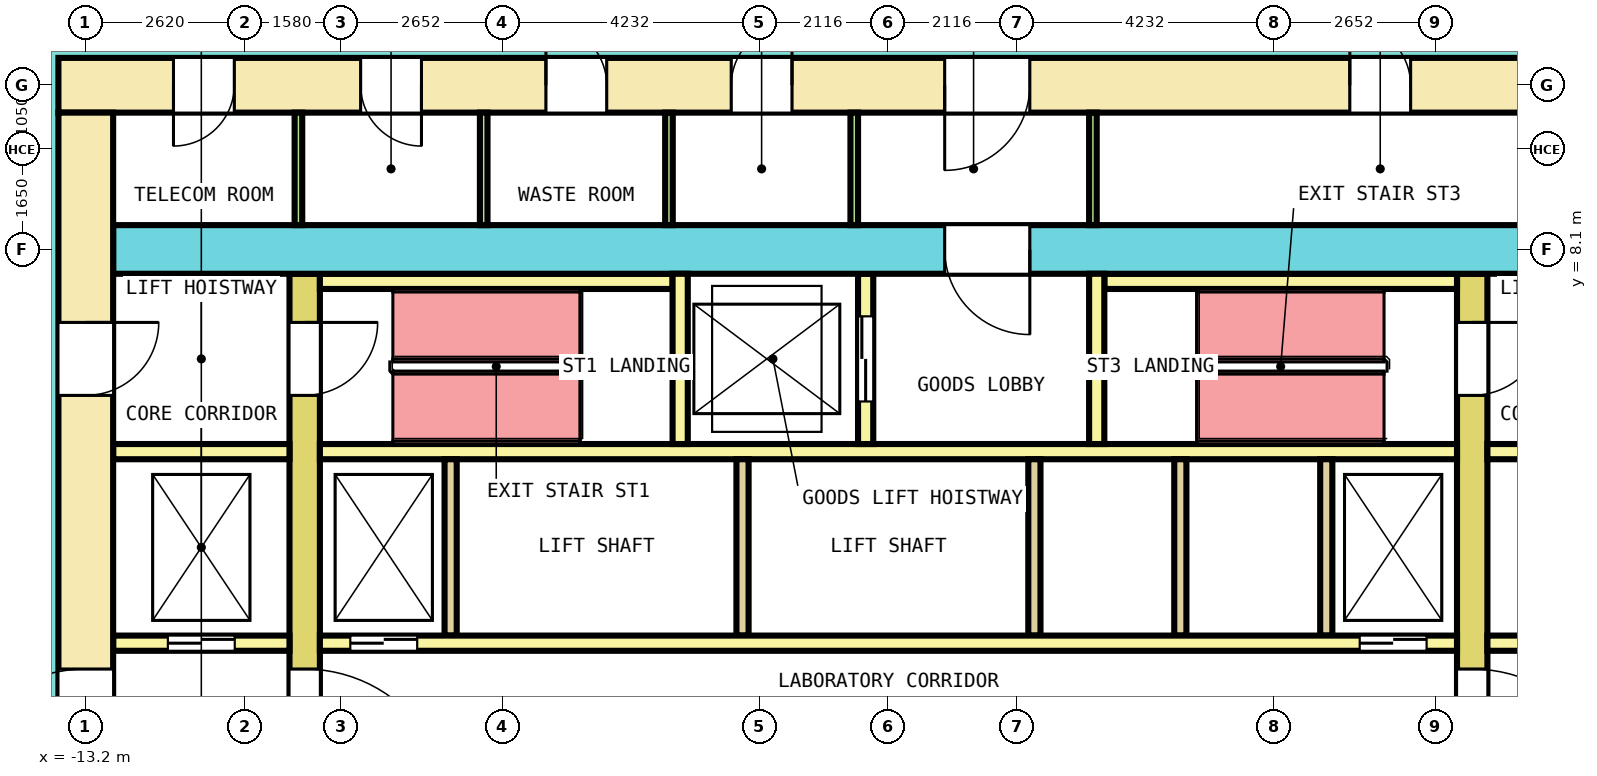
"""IFC4 building model, lengths in metres.
Left out: names, types, materials, properties, quantities, classifications, styles, units other than length and angle.
Written with IfcOpenShell. Run it as: python <this file> out.ifc"""

import sys

from ifc_helpers import new_model, si_unit, direction, frame, frame_2d, origin, place, context, subcontext, project, spatial, rectangle, extrude, element, fill, save


model = new_model("IFC4")
c1 = context("Model", 3, precision=1e-05, world=origin(), true_north=direction((0.0, 1.0)))
c2 = subcontext(c1, "Body", "Model", "MODEL_VIEW")
j1 = project(units=[si_unit("LENGTHUNIT", "METRE"), si_unit("PLANEANGLEUNIT", "RADIAN")], contexts=[c1])
p1 = place(None, origin())
s1 = spatial("IfcSite", under=j1, at=p1, CompositionType="ELEMENT")
p2 = place(p1, origin())
s2 = spatial("IfcBuilding", under=s1, at=p2, CompositionType="ELEMENT")
p3 = place(p2, frame((0.0, 0.0, 10.2)))
s3 = spatial("IfcBuildingStorey", under=s2, at=p3, CompositionType="ELEMENT", Elevation=10.2)
p4 = place(p3, frame((-13.65, 10.8, 0.0), z_axis=(0.0, 0.0, 1.0), x_axis=(1.0, 0.0, 0.0)))
e1 = element("IfcWall", 1, at=p4, inside=s3, PredefinedType="SHEAR", context=c2, shape_type="SweptSolid", body=[
    extrude(rectangle(XDim=27.3, YDim=0.9, at=frame_2d((13.65, 0.0))), origin(), (0.0, 0.0, 1.0), 4.1),
])
p5 = place(p4, frame((1.892, 0.0, 0.0)))
e2 = element("IfcOpeningElement", 2, at=p5, cuts=e1, PredefinedType="OPENING", context=c2, shape_type="SweptSolid", body=[
    extrude(rectangle(XDim=1.0, YDim=2.1, at=frame_2d((0.5, 1.05))), frame((0.0, 0.46, 0.0), z_axis=(0.0, -1.0, 0.0), x_axis=(1.0, 0.0, 0.0)), (0.0, 0.0, 1.0), 0.92),
])
p6 = place(p4, frame((4.97, 0.0, 0.0)))
e3 = element("IfcOpeningElement", 3, at=p6, cuts=e1, PredefinedType="OPENING", context=c2, shape_type="SweptSolid", body=[
    extrude(rectangle(XDim=1.0, YDim=2.1, at=frame_2d((0.5, 1.05))), frame((0.0, 0.46, 0.0), z_axis=(0.0, -1.0, 0.0), x_axis=(1.0, 0.0, 0.0)), (0.0, 0.0, 1.0), 0.92),
])
p7 = place(p4, frame((8.017, 0.0, 0.0)))
e4 = element("IfcOpeningElement", 4, at=p7, cuts=e1, PredefinedType="OPENING", context=c2, shape_type="SweptSolid", body=[
    extrude(rectangle(XDim=1.0, YDim=2.1, at=frame_2d((0.5, 1.05))), frame((0.0, 0.46, 0.0), z_axis=(0.0, -1.0, 0.0), x_axis=(1.0, 0.0, 0.0)), (0.0, 0.0, 1.0), 0.92),
])
p8 = place(p4, frame((11.064, 0.0, 0.0)))
e5 = element("IfcOpeningElement", 5, at=p8, cuts=e1, PredefinedType="OPENING", context=c2, shape_type="SweptSolid", body=[
    extrude(rectangle(XDim=1.0, YDim=2.1, at=frame_2d((0.5, 1.05))), frame((0.0, 0.46, 0.0), z_axis=(0.0, -1.0, 0.0), x_axis=(1.0, 0.0, 0.0)), (0.0, 0.0, 1.0), 0.92),
])
p9 = place(p4, frame((21.238, 0.0, 0.0)))
e6 = element("IfcOpeningElement", 6, at=p9, cuts=e1, PredefinedType="OPENING", context=c2, shape_type="SweptSolid", body=[
    extrude(rectangle(XDim=1.0, YDim=2.1, at=frame_2d((0.5, 1.05))), frame((0.0, 0.46, 0.0), z_axis=(0.0, -1.0, 0.0), x_axis=(1.0, 0.0, 0.0)), (0.0, 0.0, 1.0), 0.92),
])
p10 = place(p4, frame((14.575, 0.0, 0.0)))
e7 = element("IfcOpeningElement", 7, at=p10, cuts=e1, PredefinedType="OPENING", context=c2, shape_type="SweptSolid", body=[
    extrude(rectangle(XDim=1.4, YDim=2.1, at=frame_2d((0.7, 1.05))), frame((0.0, 0.46, 0.0), z_axis=(0.0, -1.0, 0.0), x_axis=(1.0, 0.0, 0.0)), (0.0, 0.0, 1.0), 0.92),
])
p11 = place(p3, frame((-13.2, -10.35, 0.0), z_axis=(0.0, 0.0, 1.0), x_axis=(0.0, 1.0, 0.0)))
e8 = element("IfcWall", 8, at=p11, inside=s3, PredefinedType="SHEAR", context=c2, shape_type="SweptSolid", body=[
    extrude(rectangle(XDim=20.7, YDim=0.9, at=frame_2d((10.35, 0.0))), origin(), (0.0, 0.0, 1.0), 4.1),
])
p12 = place(p11, frame((9.15, 0.0, 0.0)))
e9 = element("IfcOpeningElement", 9, at=p12, cuts=e8, PredefinedType="OPENING", context=c2, shape_type="SweptSolid", body=[
    extrude(rectangle(XDim=2.4, YDim=2.1, at=frame_2d((1.2, 1.05))), frame((0.0, 0.46, 0.0), z_axis=(0.0, -1.0, 0.0), x_axis=(1.0, 0.0, 0.0)), (0.0, 0.0, 1.0), 0.92),
])
p13 = place(p11, frame((16.05, 0.0, 0.0)))
e10 = element("IfcOpeningElement", 10, at=p13, cuts=e8, PredefinedType="OPENING", context=c2, shape_type="SweptSolid", body=[
    extrude(rectangle(XDim=1.2, YDim=2.1, at=frame_2d((0.6, 1.05))), frame((0.0, 0.46, 0.0), z_axis=(0.0, -1.0, 0.0), x_axis=(1.0, 0.0, 0.0)), (0.0, 0.0, 1.0), 0.92),
])
p14 = place(p11, frame((3.45, 0.0, 0.0)))
e11 = element("IfcOpeningElement", 11, at=p14, cuts=e8, PredefinedType="OPENING", context=c2, shape_type="SweptSolid", body=[
    extrude(rectangle(XDim=1.2, YDim=2.1, at=frame_2d((0.6, 1.05))), frame((0.0, 0.46, 0.0), z_axis=(0.0, -1.0, 0.0), x_axis=(1.0, 0.0, 0.0)), (0.0, 0.0, 1.0), 0.92),
])
p15 = place(p3, frame((-12.75, 8.1, 0.0), z_axis=(0.0, 0.0, 1.0), x_axis=(1.0, 0.0, 0.0)))
e12 = element("IfcWall", 12, at=p15, inside=s3, PredefinedType="SHEAR", context=c2, shape_type="SweptSolid", body=[
    extrude(rectangle(XDim=25.5, YDim=0.8, at=frame_2d((12.75, 0.0))), origin(), (0.0, 0.0, 1.0), 4.1),
])
p16 = place(p15, frame((13.675, 0.0, 0.0)))
e13 = element("IfcOpeningElement", 13, at=p16, cuts=e12, PredefinedType="OPENING", context=c2, shape_type="SweptSolid", body=[
    extrude(rectangle(XDim=1.4, YDim=2.1, at=frame_2d((0.7, 1.05))), frame((0.0, 0.41, 0.0), z_axis=(0.0, -1.0, 0.0), x_axis=(1.0, 0.0, 0.0)), (0.0, 0.0, 1.0), 0.82),
])
p17 = place(p3, frame((-9.6, -7.7, 0.0), z_axis=(0.0, 0.0, 1.0), x_axis=(0.0, 1.0, 0.0)))
e14 = element("IfcWall", 14, at=p17, inside=s3, PredefinedType="SHEAR", context=c2, shape_type="SweptSolid", body=[
    extrude(rectangle(XDim=15.4, YDim=0.5, at=frame_2d((7.7, 0.0))), origin(), (0.0, 0.0, 1.0), 4.1),
])
p18 = place(p17, frame((6.5, 0.0, 0.0)))
e15 = element("IfcOpeningElement", 15, at=p18, cuts=e14, PredefinedType="OPENING", context=c2, shape_type="SweptSolid", body=[
    extrude(rectangle(XDim=2.4, YDim=2.1, at=frame_2d((1.2, 1.05))), frame((0.0, 0.26, 0.0), z_axis=(0.0, -1.0, 0.0), x_axis=(1.0, 0.0, 0.0)), (0.0, 0.0, 1.0), 0.52),
])
p19 = place(p17, frame((13.4, 0.0, 0.0)))
e16 = element("IfcOpeningElement", 16, at=p19, cuts=e14, PredefinedType="OPENING", context=c2, shape_type="SweptSolid", body=[
    extrude(rectangle(XDim=1.2, YDim=2.1, at=frame_2d((0.6, 1.05))), frame((0.0, 0.26, 0.0), z_axis=(0.0, -1.0, 0.0), x_axis=(1.0, 0.0, 0.0)), (0.0, 0.0, 1.0), 0.52),
])
p20 = place(p17, frame((0.8, 0.0, 0.0)))
e17 = element("IfcOpeningElement", 17, at=p20, cuts=e14, PredefinedType="OPENING", context=c2, shape_type="SweptSolid", body=[
    extrude(rectangle(XDim=1.2, YDim=2.1, at=frame_2d((0.6, 1.05))), frame((0.0, 0.26, 0.0), z_axis=(0.0, -1.0, 0.0), x_axis=(1.0, 0.0, 0.0)), (0.0, 0.0, 1.0), 0.52),
])
p21 = place(p3, frame((9.6, -7.7, 0.0), z_axis=(0.0, 0.0, 1.0), x_axis=(0.0, 1.0, 0.0)))
e18 = element("IfcWall", 18, at=p21, inside=s3, PredefinedType="SHEAR", context=c2, shape_type="SweptSolid", body=[
    extrude(rectangle(XDim=15.4, YDim=0.5, at=frame_2d((7.7, 0.0))), origin(), (0.0, 0.0, 1.0), 4.1),
])
p22 = place(p21, frame((6.5, 0.0, 0.0)))
e19 = element("IfcOpeningElement", 19, at=p22, cuts=e18, PredefinedType="OPENING", context=c2, shape_type="SweptSolid", body=[
    extrude(rectangle(XDim=2.4, YDim=2.1, at=frame_2d((1.2, 1.05))), frame((0.0, 0.26, 0.0), z_axis=(0.0, -1.0, 0.0), x_axis=(1.0, 0.0, 0.0)), (0.0, 0.0, 1.0), 0.52),
])
p23 = place(p21, frame((13.4, 0.0, 0.0)))
e20 = element("IfcOpeningElement", 20, at=p23, cuts=e18, PredefinedType="OPENING", context=c2, shape_type="SweptSolid", body=[
    extrude(rectangle(XDim=1.2, YDim=2.1, at=frame_2d((0.6, 1.05))), frame((0.0, 0.26, 0.0), z_axis=(0.0, -1.0, 0.0), x_axis=(1.0, 0.0, 0.0)), (0.0, 0.0, 1.0), 0.52),
])
p24 = place(p21, frame((0.9, 0.0, 0.0)))
e21 = element("IfcOpeningElement", 21, at=p24, cuts=e18, PredefinedType="OPENING", context=c2, shape_type="SweptSolid", body=[
    extrude(rectangle(XDim=1.0, YDim=2.1, at=frame_2d((0.5, 1.05))), frame((0.0, 0.26, 0.0), z_axis=(0.0, -1.0, 0.0), x_axis=(1.0, 0.0, 0.0)), (0.0, 0.0, 1.0), 0.52),
])
p25 = place(p3, frame((-12.75, 1.625, 0.0), z_axis=(0.0, 0.0, 1.0), x_axis=(1.0, 0.0, 0.0)))
e22 = element("IfcWall", 22, at=p25, inside=s3, PredefinedType="SOLIDWALL", context=c2, shape_type="SweptSolid", body=[
    extrude(rectangle(XDim=2.9, YDim=0.25, at=frame_2d((1.45, 0.0))), origin(), (0.0, 0.0, 1.0), 4.1),
])
p26 = place(p25, frame((0.9, 0.0, 0.0)))
e23 = element("IfcOpeningElement", 23, at=p26, cuts=e22, PredefinedType="OPENING", context=c2, shape_type="SweptSolid", body=[
    extrude(rectangle(XDim=1.1, YDim=2.1, at=frame_2d((0.55, 1.05))), frame((0.0, 0.135, 0.0), z_axis=(0.0, -1.0, 0.0), x_axis=(1.0, 0.0, 0.0)), (0.0, 0.0, 1.0), 0.27),
])
p27 = place(p3, frame((-9.35, 1.625, 0.0), z_axis=(0.0, 0.0, 1.0), x_axis=(1.0, 0.0, 0.0)))
e24 = element("IfcWall", 24, at=p27, inside=s3, PredefinedType="SOLIDWALL", context=c2, shape_type="SweptSolid", body=[
    extrude(rectangle(XDim=18.7, YDim=0.25, at=frame_2d((9.35, 0.0))), origin(), (0.0, 0.0, 1.0), 4.1),
])
p28 = place(p27, frame((0.5, 0.0, 0.0)))
e25 = element("IfcOpeningElement", 25, at=p28, cuts=e24, PredefinedType="OPENING", context=c2, shape_type="SweptSolid", body=[
    extrude(rectangle(XDim=1.1, YDim=2.1, at=frame_2d((0.55, 1.05))), frame((0.0, 0.135, 0.0), z_axis=(0.0, -1.0, 0.0), x_axis=(1.0, 0.0, 0.0)), (0.0, 0.0, 1.0), 0.27),
])
p29 = place(p27, frame((17.1, 0.0, 0.0)))
e26 = element("IfcOpeningElement", 26, at=p29, cuts=e24, PredefinedType="OPENING", context=c2, shape_type="SweptSolid", body=[
    extrude(rectangle(XDim=1.1, YDim=2.1, at=frame_2d((0.55, 1.05))), frame((0.0, 0.135, 0.0), z_axis=(0.0, -1.0, 0.0), x_axis=(1.0, 0.0, 0.0)), (0.0, 0.0, 1.0), 0.27),
])
p30 = place(p3, frame((9.85, 1.625, 0.0), z_axis=(0.0, 0.0, 1.0), x_axis=(1.0, 0.0, 0.0)))
e27 = element("IfcWall", 27, at=p30, inside=s3, PredefinedType="SOLIDWALL", context=c2, shape_type="SweptSolid", body=[
    extrude(rectangle(XDim=2.9, YDim=0.25, at=frame_2d((1.45, 0.0))), origin(), (0.0, 0.0, 1.0), 4.1),
])
p31 = place(p30, frame((0.9, 0.0, 0.0)))
e28 = element("IfcOpeningElement", 28, at=p31, cuts=e27, PredefinedType="OPENING", context=c2, shape_type="SweptSolid", body=[
    extrude(rectangle(XDim=1.1, YDim=2.1, at=frame_2d((0.55, 1.05))), frame((0.0, 0.135, 0.0), z_axis=(0.0, -1.0, 0.0), x_axis=(1.0, 0.0, 0.0)), (0.0, 0.0, 1.0), 0.27),
])
p32 = place(p3, frame((-12.75, 4.775, 0.0), z_axis=(0.0, 0.0, 1.0), x_axis=(1.0, 0.0, 0.0)))
e29 = element("IfcWall", 29, at=p32, inside=s3, PredefinedType="SOLIDWALL", context=c2, shape_type="SweptSolid", body=[
    extrude(rectangle(XDim=2.9, YDim=0.25, at=frame_2d((1.45, 0.0))), origin(), (0.0, 0.0, 1.0), 4.1),
])
p33 = place(p3, frame((-9.35, 4.775, 0.0), z_axis=(0.0, 0.0, 1.0), x_axis=(1.0, 0.0, 0.0)))
e30 = element("IfcWall", 30, at=p33, inside=s3, PredefinedType="SOLIDWALL", context=c2, shape_type="SweptSolid", body=[
    extrude(rectangle(XDim=18.7, YDim=0.25, at=frame_2d((9.35, 0.0))), origin(), (0.0, 0.0, 1.0), 4.1),
])
p34 = place(p3, frame((9.85, 4.775, 0.0), z_axis=(0.0, 0.0, 1.0), x_axis=(1.0, 0.0, 0.0)))
e31 = element("IfcWall", 31, at=p34, inside=s3, PredefinedType="SOLIDWALL", context=c2, shape_type="SweptSolid", body=[
    extrude(rectangle(XDim=2.9, YDim=0.25, at=frame_2d((1.45, 0.0))), origin(), (0.0, 0.0, 1.0), 4.1),
])
for number, where, z_axis, x_axis in (
    (32, (-7.2, 1.75, 0.0), (0.0, 0.0, 1.0), (0.0, 1.0, 0.0)),
    (33, (-2.4, 1.75, 0.0), (0.0, 0.0, 1.0), (0.0, 1.0, 0.0)),
    (34, (2.4, 1.75, 0.0), (0.0, 0.0, 1.0), (0.0, 1.0, 0.0)),
    (35, (4.8, 1.75, 0.0), (0.0, 0.0, 1.0), (0.0, 1.0, 0.0)),
    (36, (7.2, 1.75, 0.0), (0.0, 0.0, 1.0), (0.0, 1.0, 0.0)),
):
    element("IfcWall", number, at=place(p3, frame(where, z_axis=z_axis, x_axis=x_axis)), inside=s3, PredefinedType="SOLIDWALL", context=c2, shape_type="SweptSolid", body=[
        extrude(rectangle(XDim=2.9, YDim=0.2, at=frame_2d((1.45, 0.0))), origin(), (0.0, 0.0, 1.0), 4.1),
    ])
for number, where, z_axis, x_axis in (
    (37, (-9.35, 7.575, 0.0), (0.0, 0.0, 1.0), (1.0, 0.0, 0.0)),
    (38, (3.55, 7.575, 0.0), (0.0, 0.0, 1.0), (1.0, 0.0, 0.0)),
):
    element("IfcWall", number, at=place(p3, frame(where, z_axis=z_axis, x_axis=x_axis)), inside=s3, PredefinedType="SOLIDWALL", context=c2, shape_type="SweptSolid", body=[
        extrude(rectangle(XDim=5.8, YDim=0.25, at=frame_2d((2.9, 0.0))), origin(), (0.0, 0.0, 1.0), 4.1),
    ])
p35 = place(p3, frame((-3.425, 4.9, 0.0), z_axis=(0.0, 0.0, 1.0), x_axis=(0.0, 1.0, 0.0)))
e39 = element("IfcWall", 39, at=p35, inside=s3, PredefinedType="SOLIDWALL", context=c2, shape_type="SweptSolid", body=[
    extrude(rectangle(XDim=2.8, YDim=0.25, at=frame_2d((1.4, 0.0))), origin(), (0.0, 0.0, 1.0), 4.1),
])
p36 = place(p3, frame((-0.375, 4.9, 0.0), z_axis=(0.0, 0.0, 1.0), x_axis=(0.0, 1.0, 0.0)))
e40 = element("IfcWall", 40, at=p36, inside=s3, PredefinedType="SOLIDWALL", context=c2, shape_type="SweptSolid", body=[
    extrude(rectangle(XDim=2.8, YDim=0.25, at=frame_2d((1.4, 0.0))), origin(), (0.0, 0.0, 1.0), 4.1),
])
p37 = place(p36, frame((0.7, 0.0, 0.0)))
e41 = element("IfcOpeningElement", 41, at=p37, cuts=e40, PredefinedType="OPENING", context=c2, shape_type="SweptSolid", body=[
    extrude(rectangle(XDim=1.4, YDim=2.1, at=frame_2d((0.7, 1.05))), frame((0.0, 0.135, 0.0), z_axis=(0.0, -1.0, 0.0), x_axis=(1.0, 0.0, 0.0)), (0.0, 0.0, 1.0), 0.27),
])
p38 = place(p3, frame((3.425, 4.9, 0.0), z_axis=(0.0, 0.0, 1.0), x_axis=(0.0, 1.0, 0.0)))
e42 = element("IfcWall", 42, at=p38, inside=s3, PredefinedType="SOLIDWALL", context=c2, shape_type="SweptSolid", body=[
    extrude(rectangle(XDim=2.8, YDim=0.25, at=frame_2d((1.4, 0.0))), origin(), (0.0, 0.0, 1.0), 4.1),
])
for number, where, z_axis, x_axis in (
    (43, (-9.703, 8.5, 0.0), (0.0, 0.0, 1.0), (0.0, 1.0, 0.0)),
    (44, (-6.656, 8.5, 0.0), (0.0, 0.0, 1.0), (0.0, 1.0, 0.0)),
    (45, (-3.609, 8.5, 0.0), (0.0, 0.0, 1.0), (0.0, 1.0, 0.0)),
    (46, (-0.562, 8.5, 0.0), (0.0, 0.0, 1.0), (0.0, 1.0, 0.0)),
    (47, (3.363, 8.5, 0.0), (0.0, 0.0, 1.0), (0.0, 1.0, 0.0)),
):
    element("IfcWall", number, at=place(p3, frame(where, z_axis=z_axis, x_axis=x_axis)), inside=s3, PredefinedType="PARTITIONING", context=c2, shape_type="SweptSolid", body=[
        extrude(rectangle(XDim=1.85, YDim=0.125, at=frame_2d((0.925, 0.0))), origin(), (0.0, 0.0, 1.0), 4.1),
    ])
p39 = place(p26, origin())
e48 = element("IfcDoor", 48, at=p39, inside=s3, OperationType="DOUBLE_DOOR_SLIDING", PredefinedType="DOOR", context=c2, shape_type="SweptSolid", body=[
    extrude(rectangle(XDim=1.1, YDim=2.1, at=frame_2d((0.55, 1.05))), frame((0.0, 0.075, 0.0), z_axis=(0.0, -1.0, 0.0), x_axis=(1.0, 0.0, 0.0)), (0.0, 0.0, 1.0), 0.15),
])
fill(e23, e48)
p40 = place(p28, origin())
e49 = element("IfcDoor", 49, at=p40, inside=s3, OperationType="DOUBLE_DOOR_SLIDING", PredefinedType="DOOR", context=c2, shape_type="SweptSolid", body=[
    extrude(rectangle(XDim=1.1, YDim=2.1, at=frame_2d((0.55, 1.05))), frame((0.0, 0.075, 0.0), z_axis=(0.0, -1.0, 0.0), x_axis=(1.0, 0.0, 0.0)), (0.0, 0.0, 1.0), 0.15),
])
fill(e25, e49)
p41 = place(p29, origin())
e50 = element("IfcDoor", 50, at=p41, inside=s3, OperationType="DOUBLE_DOOR_SLIDING", PredefinedType="DOOR", context=c2, shape_type="SweptSolid", body=[
    extrude(rectangle(XDim=1.1, YDim=2.1, at=frame_2d((0.55, 1.05))), frame((0.0, 0.075, 0.0), z_axis=(0.0, -1.0, 0.0), x_axis=(1.0, 0.0, 0.0)), (0.0, 0.0, 1.0), 0.15),
])
fill(e26, e50)
p42 = place(p37, origin())
e51 = element("IfcDoor", 51, at=p42, inside=s3, OperationType="DOUBLE_DOOR_SLIDING", PredefinedType="DOOR", context=c2, shape_type="SweptSolid", body=[
    extrude(rectangle(XDim=1.4, YDim=2.1, at=frame_2d((0.7, 1.05))), frame((0.0, 0.075, 0.0), z_axis=(0.0, -1.0, 0.0), x_axis=(1.0, 0.0, 0.0)), (0.0, 0.0, 1.0), 0.15),
])
fill(e41, e51)
p43 = place(p18, origin())
e52 = element("IfcDoor", 52, at=p43, inside=s3, OperationType="DOUBLE_DOOR_SINGLE_SWING", PredefinedType="DOOR", context=c2, shape_type="SweptSolid", body=[
    extrude(rectangle(XDim=2.4, YDim=2.1, at=frame_2d((1.2, 1.05))), frame((0.0, 0.2, 0.0), z_axis=(0.0, -1.0, 0.0), x_axis=(1.0, 0.0, 0.0)), (0.0, 0.0, 1.0), 0.4),
])
fill(e15, e52)
p44 = place(p22, origin())
e53 = element("IfcDoor", 53, at=p44, inside=s3, OperationType="DOUBLE_DOOR_SINGLE_SWING", PredefinedType="DOOR", context=c2, shape_type="SweptSolid", body=[
    extrude(rectangle(XDim=2.4, YDim=2.1, at=frame_2d((1.2, 1.05))), frame((0.0, 0.2, 0.0), z_axis=(0.0, -1.0, 0.0), x_axis=(1.0, 0.0, 0.0)), (0.0, 0.0, 1.0), 0.4),
])
fill(e19, e53)
p45 = place(p12, origin())
e54 = element("IfcDoor", 54, at=p45, inside=s3, OperationType="DOUBLE_DOOR_SINGLE_SWING", PredefinedType="DOOR", context=c2, shape_type="SweptSolid", body=[
    extrude(rectangle(XDim=2.4, YDim=2.1, at=frame_2d((1.2, 1.05))), frame((0.0, 0.3, 0.0), z_axis=(0.0, -1.0, 0.0), x_axis=(1.0, 0.0, 0.0)), (0.0, 0.0, 1.0), 0.6),
])
fill(e9, e54)
p46 = place(p19, origin())
e55 = element("IfcDoor", 55, at=p46, inside=s3, OperationType="SINGLE_SWING_LEFT", PredefinedType="DOOR", context=c2, shape_type="SweptSolid", body=[
    extrude(rectangle(XDim=1.2, YDim=2.1, at=frame_2d((0.6, 1.05))), frame((0.0, 0.2, 0.0), z_axis=(0.0, -1.0, 0.0), x_axis=(1.0, 0.0, 0.0)), (0.0, 0.0, 1.0), 0.4),
])
fill(e16, e55)
p47 = place(p13, origin())
e56 = element("IfcDoor", 56, at=p47, inside=s3, OperationType="SINGLE_SWING_RIGHT", PredefinedType="DOOR", context=c2, shape_type="SweptSolid", body=[
    extrude(rectangle(XDim=1.2, YDim=2.1, at=frame_2d((0.6, 1.05))), frame((0.0, 0.3, 0.0), z_axis=(0.0, -1.0, 0.0), x_axis=(1.0, 0.0, 0.0)), (0.0, 0.0, 1.0), 0.6),
])
fill(e10, e56)
p48 = place(p23, origin())
e57 = element("IfcDoor", 57, at=p48, inside=s3, OperationType="SINGLE_SWING_LEFT", PredefinedType="DOOR", context=c2, shape_type="SweptSolid", body=[
    extrude(rectangle(XDim=1.2, YDim=2.1, at=frame_2d((0.6, 1.05))), frame((0.0, 0.2, 0.0), z_axis=(0.0, -1.0, 0.0), x_axis=(1.0, 0.0, 0.0)), (0.0, 0.0, 1.0), 0.4),
])
fill(e20, e57)
p49 = place(p16, origin())
e58 = element("IfcDoor", 58, at=p49, inside=s3, OperationType="DOUBLE_DOOR_SINGLE_SWING", PredefinedType="DOOR", context=c2, shape_type="SweptSolid", body=[
    extrude(rectangle(XDim=1.4, YDim=2.1, at=frame_2d((0.7, 1.05))), frame((0.0, 0.3, 0.0), z_axis=(0.0, -1.0, 0.0), x_axis=(1.0, 0.0, 0.0)), (0.0, 0.0, 1.0), 0.6),
])
fill(e13, e58)
p50 = place(p5, origin())
e59 = element("IfcDoor", 59, at=p50, inside=s3, OperationType="SINGLE_SWING_RIGHT", PredefinedType="DOOR", context=c2, shape_type="SweptSolid", body=[
    extrude(rectangle(XDim=1.0, YDim=2.1, at=frame_2d((0.5, 1.05))), frame((0.0, 0.3, 0.0), z_axis=(0.0, -1.0, 0.0), x_axis=(1.0, 0.0, 0.0)), (0.0, 0.0, 1.0), 0.6),
])
fill(e2, e59)
p51 = place(p6, origin())
e60 = element("IfcDoor", 60, at=p51, inside=s3, OperationType="SINGLE_SWING_LEFT", PredefinedType="DOOR", context=c2, shape_type="SweptSolid", body=[
    extrude(rectangle(XDim=1.0, YDim=2.1, at=frame_2d((0.5, 1.05))), frame((0.0, 0.3, 0.0), z_axis=(0.0, -1.0, 0.0), x_axis=(1.0, 0.0, 0.0)), (0.0, 0.0, 1.0), 0.6),
])
fill(e3, e60)
p52 = place(p7, origin())
e61 = element("IfcDoor", 61, at=p52, inside=s3, OperationType="SINGLE_SWING_RIGHT", PredefinedType="DOOR", context=c2, shape_type="SweptSolid", body=[
    extrude(rectangle(XDim=1.0, YDim=2.1, at=frame_2d((0.5, 1.05))), frame((0.0, 0.3, 0.0), z_axis=(0.0, -1.0, 0.0), x_axis=(1.0, 0.0, 0.0)), (0.0, 0.0, 1.0), 0.6),
])
fill(e4, e61)
p53 = place(p8, origin())
e62 = element("IfcDoor", 62, at=p53, inside=s3, OperationType="SINGLE_SWING_LEFT", PredefinedType="DOOR", context=c2, shape_type="SweptSolid", body=[
    extrude(rectangle(XDim=1.0, YDim=2.1, at=frame_2d((0.5, 1.05))), frame((0.0, 0.3, 0.0), z_axis=(0.0, -1.0, 0.0), x_axis=(1.0, 0.0, 0.0)), (0.0, 0.0, 1.0), 0.6),
])
fill(e5, e62)
p54 = place(p9, origin())
e63 = element("IfcDoor", 63, at=p54, inside=s3, OperationType="SINGLE_SWING_RIGHT", PredefinedType="DOOR", context=c2, shape_type="SweptSolid", body=[
    extrude(rectangle(XDim=1.0, YDim=2.1, at=frame_2d((0.5, 1.05))), frame((0.0, 0.3, 0.0), z_axis=(0.0, -1.0, 0.0), x_axis=(1.0, 0.0, 0.0)), (0.0, 0.0, 1.0), 0.6),
])
fill(e6, e63)
p55 = place(p10, origin())
e64 = element("IfcDoor", 64, at=p55, inside=s3, OperationType="DOUBLE_DOOR_SINGLE_SWING", PredefinedType="DOOR", context=c2, shape_type="SweptSolid", body=[
    extrude(rectangle(XDim=1.4, YDim=2.1, at=frame_2d((0.7, 1.05))), frame((0.0, 0.3, 0.0), z_axis=(0.0, -1.0, 0.0), x_axis=(1.0, 0.0, 0.0)), (0.0, 0.0, 1.0), 0.6),
])
fill(e7, e64)
save(model, sys.argv[1])
